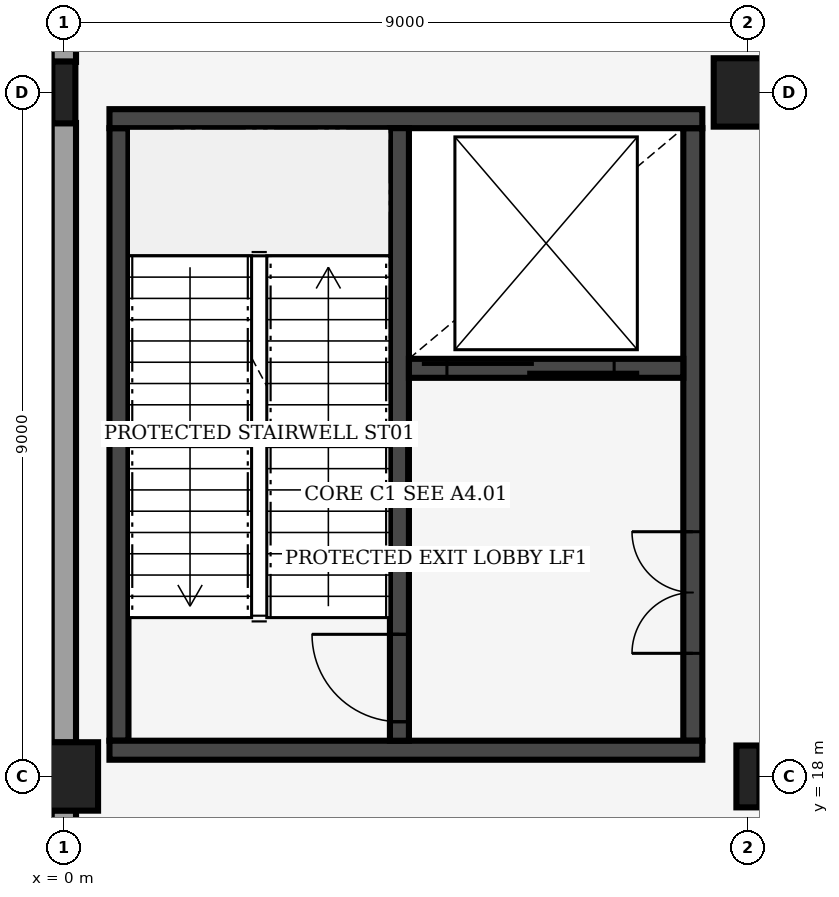
"""IFC4 building model, lengths in metres.
Left out: names, types, materials, properties, quantities, classifications, styles, units other than length and angle.
Written with IfcOpenShell. Run it as: python <this file> out.ifc"""

import sys

from ifc_helpers import new_model, si_unit, direction, frame, frame_2d, origin, origin_2d, place, context, subcontext, project, spatial, rectangle, i_section, extrude, element, fill, save


model = new_model("IFC4")
c1 = context("Model", 3, precision=1e-05, world=origin(), true_north=direction((0.0, 1.0)))
c2 = subcontext(c1, "Body", "Model", "MODEL_VIEW")
j1 = project(units=[si_unit("LENGTHUNIT", "METRE"), si_unit("PLANEANGLEUNIT", "RADIAN")], contexts=[c1])
p1 = place(None, origin())
s1 = spatial("IfcSite", under=j1, at=p1, CompositionType="ELEMENT")
p2 = place(p1, origin())
s2 = spatial("IfcBuilding", under=s1, at=p2, CompositionType="ELEMENT")
p3 = place(p2, origin())
s3 = spatial("IfcBuildingStorey", under=s2, at=p3, CompositionType="ELEMENT", Elevation=0.0)
p4 = place(p3, frame((0.0, 18.0, 0.0), z_axis=(0.0, 0.0, 1.0), x_axis=(1.0, 0.0, 0.0)))
e1 = element("IfcColumn", 1, at=p4, inside=s3, PredefinedType="COLUMN", context=c2, shape_type="SweptSolid", body=[
    extrude(rectangle(XDim=0.9, YDim=0.9, at=origin_2d()), origin(), (0.0, 0.0, 1.0), 6.0),
])
for number, where, z_axis, x_axis in (
    (2, (0.0, 27.0, 0.0), (0.0, 0.0, 1.0), (1.0, 0.0, 0.0)),
    (3, (9.0, 18.0, 0.0), (0.0, 0.0, 1.0), (1.0, 0.0, 0.0)),
):
    element("IfcColumn", number, at=place(p3, frame(where, z_axis=z_axis, x_axis=x_axis)), inside=s3, PredefinedType="COLUMN", context=c2, shape_type="SweptSolid", body=[
        extrude(i_section(OverallWidth=0.303, OverallDepth=0.814, WebThickness=0.021, FlangeThickness=0.04, FilletRadius=0.03, at=origin_2d()), origin(), (0.0, 0.0, 1.0), 6.0),
    ])
p5 = place(p3, frame((9.0, 27.0, 0.0), z_axis=(0.0, 0.0, 1.0), x_axis=(1.0, 0.0, 0.0)))
e4 = element("IfcColumn", 4, at=p5, inside=s3, PredefinedType="COLUMN", context=c2, shape_type="SweptSolid", body=[
    extrude(rectangle(XDim=0.9, YDim=0.9, at=origin_2d()), origin(), (0.0, 0.0, 1.0), 6.0),
])
p6 = place(p3, frame((0.0, 9.249, 0.0), z_axis=(0.0, 0.0, 1.0), x_axis=(0.0, 1.0, 0.0)))
e5 = element("IfcWall", 5, at=p6, inside=s3, PredefinedType="SOLIDWALL", context=c2, shape_type="SweptSolid", body=[
    extrude(rectangle(XDim=8.306, YDim=0.32, at=frame_2d((4.153, 0.0))), origin(), (0.0, 0.0, 1.0), 4.95),
])
p7 = place(p6, frame((1.701, 0.0, 0.85)))
e6 = element("IfcOpeningElement", 6, at=p7, cuts=e5, PredefinedType="OPENING", context=c2, shape_type="SweptSolid", body=[
    extrude(rectangle(XDim=2.4, YDim=2.1, at=frame_2d((1.2, 1.05))), frame((0.0, 0.17, 0.0), z_axis=(0.0, -1.0, 0.0), x_axis=(1.0, 0.0, 0.0)), (0.0, 0.0, 1.0), 0.34),
])
p8 = place(p6, frame((5.101, 0.0, 0.85)))
e7 = element("IfcOpeningElement", 7, at=p8, cuts=e5, PredefinedType="OPENING", context=c2, shape_type="SweptSolid", body=[
    extrude(rectangle(XDim=2.2, YDim=2.1, at=frame_2d((1.1, 1.05))), frame((0.0, 0.17, 0.0), z_axis=(0.0, -1.0, 0.0), x_axis=(1.0, 0.0, 0.0)), (0.0, 0.0, 1.0), 0.34),
])
p9 = place(p3, frame((0.0, 18.445, 0.0), z_axis=(0.0, 0.0, 1.0), x_axis=(0.0, 1.0, 0.0)))
e8 = element("IfcWall", 8, at=p9, inside=s3, PredefinedType="SOLIDWALL", context=c2, shape_type="SweptSolid", body=[
    extrude(rectangle(XDim=8.153, YDim=0.32, at=frame_2d((4.076, 0.0))), origin(), (0.0, 0.0, 1.0), 4.95),
])
p10 = place(p3, frame((0.0, 27.402, 0.0), z_axis=(0.0, 0.0, 1.0), x_axis=(0.0, 1.0, 0.0)))
e9 = element("IfcWall", 9, at=p10, inside=s3, PredefinedType="SOLIDWALL", context=c2, shape_type="SweptSolid", body=[
    extrude(rectangle(XDim=8.153, YDim=0.32, at=frame_2d((4.076, 0.0))), origin(), (0.0, 0.0, 1.0), 4.95),
])
p11 = place(p10, frame((1.548, 0.0, 0.85)))
e10 = element("IfcOpeningElement", 10, at=p11, cuts=e9, PredefinedType="OPENING", context=c2, shape_type="SweptSolid", body=[
    extrude(rectangle(XDim=2.0, YDim=2.1, at=frame_2d((1.0, 1.05))), frame((0.0, 0.17, 0.0), z_axis=(0.0, -1.0, 0.0), x_axis=(1.0, 0.0, 0.0)), (0.0, 0.0, 1.0), 0.34),
])
p12 = place(p10, frame((4.948, 0.0, 0.85)))
e11 = element("IfcOpeningElement", 11, at=p12, cuts=e9, PredefinedType="OPENING", context=c2, shape_type="SweptSolid", body=[
    extrude(rectangle(XDim=1.8, YDim=2.1, at=frame_2d((0.9, 1.05))), frame((0.0, 0.17, 0.0), z_axis=(0.0, -1.0, 0.0), x_axis=(1.0, 0.0, 0.0)), (0.0, 0.0, 1.0), 0.34),
])
p13 = place(p3, frame((0.725, 18.47, 0.0), z_axis=(0.0, 0.0, 1.0), x_axis=(0.0, 1.0, 0.0)))
e12 = element("IfcWall", 12, at=p13, inside=s3, PredefinedType="SHEAR", context=c2, shape_type="SweptSolid", body=[
    extrude(rectangle(XDim=8.06, YDim=0.25, at=frame_2d((4.03, 0.0))), origin(), (0.0, 0.0, 1.0), 5.7),
])
p14 = place(p3, frame((8.275, 18.47, 0.0), z_axis=(0.0, 0.0, 1.0), x_axis=(0.0, 1.0, 0.0)))
e13 = element("IfcWall", 13, at=p14, inside=s3, PredefinedType="SHEAR", context=c2, shape_type="SweptSolid", body=[
    extrude(rectangle(XDim=8.06, YDim=0.25, at=frame_2d((4.03, 0.0))), origin(), (0.0, 0.0, 1.0), 5.7),
])
p15 = place(p14, frame((1.15, 0.0, 0.0)))
e14 = element("IfcOpeningElement", 14, at=p15, cuts=e13, PredefinedType="OPENING", context=c2, shape_type="SweptSolid", body=[
    extrude(rectangle(XDim=1.6, YDim=2.2, at=frame_2d((0.8, 1.1))), frame((0.0, 0.135, 0.0), z_axis=(0.0, -1.0, 0.0), x_axis=(1.0, 0.0, 0.0)), (0.0, 0.0, 1.0), 0.27),
])
for number, where, z_axis, x_axis in (
    (15, (0.6, 18.345, 0.0), (0.0, 0.0, 1.0), (1.0, 0.0, 0.0)),
    (16, (0.6, 26.655, 0.0), (0.0, 0.0, 1.0), (1.0, 0.0, 0.0)),
):
    element("IfcWall", number, at=place(p3, frame(where, z_axis=z_axis, x_axis=x_axis)), inside=s3, PredefinedType="SHEAR", context=c2, shape_type="SweptSolid", body=[
        extrude(rectangle(XDim=7.8, YDim=0.25, at=frame_2d((3.9, 0.0))), origin(), (0.0, 0.0, 1.0), 5.7),
    ])
p16 = place(p3, frame((4.415, 18.47, 0.0), z_axis=(0.0, 0.0, 1.0), x_axis=(0.0, 1.0, 0.0)))
e17 = element("IfcWall", 17, at=p16, inside=s3, PredefinedType="SHEAR", context=c2, shape_type="SweptSolid", body=[
    extrude(rectangle(XDim=8.06, YDim=0.25, at=frame_2d((4.03, 0.0))), origin(), (0.0, 0.0, 1.0), 5.7),
])
p17 = place(p16, frame((0.25, 0.0, 0.0)))
e18 = element("IfcOpeningElement", 18, at=p17, cuts=e17, PredefinedType="OPENING", context=c2, shape_type="SweptSolid", body=[
    extrude(rectangle(XDim=1.15, YDim=2.15, at=frame_2d((0.575, 1.075))), frame((0.0, 0.135, 0.0), z_axis=(0.0, -1.0, 0.0), x_axis=(1.0, 0.0, 0.0)), (0.0, 0.0, 1.0), 0.27),
])
p18 = place(p3, frame((4.54, 23.37, 0.0), z_axis=(0.0, 0.0, 1.0), x_axis=(1.0, 0.0, 0.0)))
e19 = element("IfcWall", 19, at=p18, inside=s3, PredefinedType="SHEAR", context=c2, shape_type="SweptSolid", body=[
    extrude(rectangle(XDim=3.61, YDim=0.25, at=frame_2d((1.805, 0.0))), origin(), (0.0, 0.0, 1.0), 5.7),
])
p19 = place(p18, frame((0.5, 0.0, 0.0)))
e20 = element("IfcOpeningElement", 20, at=p19, cuts=e19, PredefinedType="OPENING", context=c2, shape_type="SweptSolid", body=[
    extrude(rectangle(XDim=2.2, YDim=2.4, at=frame_2d((1.1, 1.2))), frame((0.0, 0.135, 0.0), z_axis=(0.0, -1.0, 0.0), x_axis=(1.0, 0.0, 0.0)), (0.0, 0.0, 1.0), 0.27),
])
p20 = place(p3, frame((9.0, 18.2, 0.0), z_axis=(0.0, 0.0, 1.0), x_axis=(1.0, 0.0, 0.0)))
e21 = element("IfcWall", 21, at=p20, inside=s3, PredefinedType="PARTITIONING", context=c2, shape_type="SweptSolid", body=[
    extrude(rectangle(XDim=8.8, YDim=0.125, at=frame_2d((4.4, 0.0))), origin(), (0.0, 0.0, 1.0), 4.85),
])
p21 = place(p20, frame((1.45, 0.0, 0.0)))
e22 = element("IfcOpeningElement", 22, at=p21, cuts=e21, PredefinedType="OPENING", context=c2, shape_type="SweptSolid", body=[
    extrude(rectangle(XDim=0.98, YDim=2.12, at=frame_2d((0.49, 1.06))), frame((0.0, 0.073, 0.0), z_axis=(0.0, -1.0, 0.0), x_axis=(1.0, 0.0, 0.0)), (0.0, 0.0, 1.0), 0.145),
])
p22 = place(p17, origin())
e23 = element("IfcDoor", 23, at=p22, inside=s3, OperationType="SINGLE_SWING_RIGHT", PredefinedType="DOOR", context=c2, shape_type="SweptSolid", body=[
    extrude(rectangle(XDim=1.15, YDim=2.15, at=frame_2d((0.575, 1.075))), frame((0.0, 0.025, 0.0), z_axis=(0.0, -1.0, 0.0), x_axis=(1.0, 0.0, 0.0)), (0.0, 0.0, 1.0), 0.05),
])
fill(e18, e23)
p23 = place(p19, origin())
e24 = element("IfcDoor", 24, at=p23, inside=s3, OperationType="DOUBLE_DOOR_SLIDING", PredefinedType="DOOR", context=c2, shape_type="SweptSolid", body=[
    extrude(rectangle(XDim=2.2, YDim=2.4, at=frame_2d((1.1, 1.2))), frame((0.0, 0.025, 0.0), z_axis=(0.0, -1.0, 0.0), x_axis=(1.0, 0.0, 0.0)), (0.0, 0.0, 1.0), 0.05),
])
fill(e20, e24)
p24 = place(p15, origin())
e25 = element("IfcDoor", 25, at=p24, inside=s3, OperationType="DOUBLE_DOOR_SINGLE_SWING", PredefinedType="DOOR", context=c2, shape_type="SweptSolid", body=[
    extrude(rectangle(XDim=1.6, YDim=2.2, at=frame_2d((0.8, 1.1))), frame((0.0, 0.025, 0.0), z_axis=(0.0, -1.0, 0.0), x_axis=(1.0, 0.0, 0.0)), (0.0, 0.0, 1.0), 0.05),
])
fill(e14, e25)
save(model, sys.argv[1])
